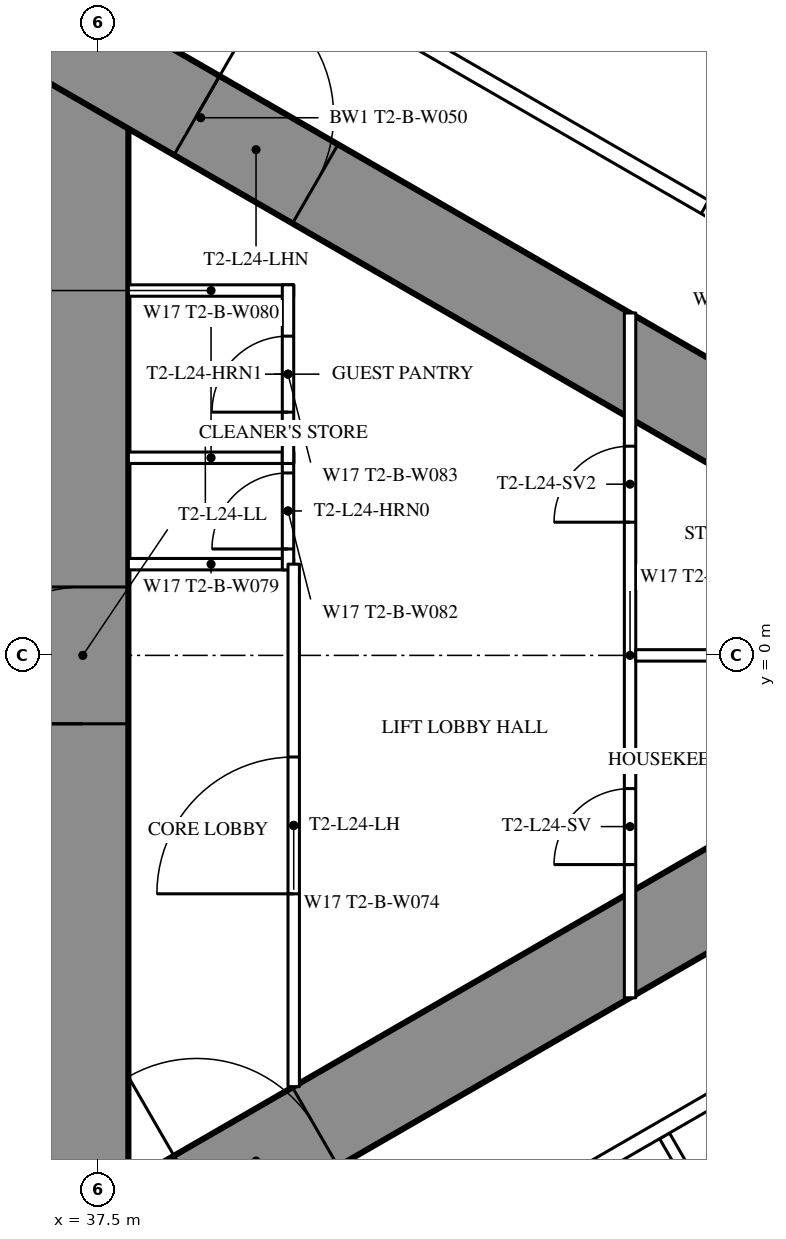
"""IFC4 building model, lengths in metres.
Left out: names, types, materials, properties, quantities, classifications, styles, units other than length and angle.
Written with IfcOpenShell. Run it as: python <this file> out.ifc"""

import sys

from ifc_helpers import new_model, si_unit, direction, frame, frame_2d, origin, place, context, subcontext, project, spatial, rectangle, extrude, element, fill, save


model = new_model("IFC4")
c1 = context("Model", 3, precision=1e-05, world=origin(), true_north=direction((0.0, 1.0)))
c2 = subcontext(c1, "Body", "Model", "MODEL_VIEW")
j1 = project(units=[si_unit("LENGTHUNIT", "METRE"), si_unit("PLANEANGLEUNIT", "RADIAN")], contexts=[c1])
p1 = place(None, origin())
s1 = spatial("IfcSite", under=j1, at=p1, CompositionType="ELEMENT")
p2 = place(p1, origin())
s2 = spatial("IfcBuilding", under=s1, at=p2, CompositionType="ELEMENT")
p3 = place(p2, frame((0.0, 0.0, 94.1)))
s3 = spatial("IfcBuildingStorey", under=s2, at=p3, CompositionType="ELEMENT", Elevation=94.1)
p4 = place(p3, frame((37.3, -8.6, 0.0), z_axis=(0.0, 0.0, 1.0), x_axis=(0.0, 1.0, 0.0)))
e1 = element("IfcWall", 1, at=p4, inside=s3, PredefinedType="SHEAR", context=c2, shape_type="SweptSolid", body=[
    extrude(rectangle(XDim=17.2, YDim=1.2, at=frame_2d((8.6, 0.0))), origin(), (0.0, 0.0, 1.0), 3.5),
])
p5 = place(p4, frame((7.7, 0.0, 0.0)))
e2 = element("IfcOpeningElement", 2, at=p5, cuts=e1, PredefinedType="OPENING", context=c2, shape_type="SweptSolid", body=[
    extrude(rectangle(XDim=1.8, YDim=2.2, at=frame_2d((0.9, 1.1))), frame((0.0, 0.61, 0.0), z_axis=(0.0, -1.0, 0.0), x_axis=(1.0, 0.0, 0.0)), (0.0, 0.0, 1.0), 1.22),
])
p6 = place(p3, frame((27.2, -13.8, 0.0), z_axis=(0.0, 0.0, 1.0), x_axis=(0.866027159892, 0.499996958321, 0.0)))
e3 = element("IfcWall", 3, at=p6, inside=s3, PredefinedType="SHEAR", context=c2, shape_type="SweptSolid", body=[
    extrude(rectangle(XDim=27.947, YDim=1.2, at=frame_2d((13.973, 0.0))), origin(), (0.0, 0.0, 1.0), 3.5),
])
p7 = place(p6, frame((4.6, 0.0, 0.0)))
e4 = element("IfcOpeningElement", 4, at=p7, cuts=e3, PredefinedType="OPENING", context=c2, shape_type="SweptSolid", body=[
    extrude(rectangle(XDim=1.0, YDim=2.2, at=frame_2d((0.5, 1.1))), frame((0.0, 0.61, 0.0), z_axis=(0.0, -1.0, 0.0), x_axis=(1.0, 0.0, 0.0)), (0.0, 0.0, 1.0), 1.22),
])
p8 = place(p6, frame((13.395, 0.0, 0.0)))
e5 = element("IfcOpeningElement", 5, at=p8, cuts=e3, PredefinedType="OPENING", context=c2, shape_type="SweptSolid", body=[
    extrude(rectangle(XDim=1.8, YDim=2.2, at=frame_2d((0.9, 1.1))), frame((0.0, 0.61, 0.0), z_axis=(0.0, -1.0, 0.0), x_axis=(1.0, 0.0, 0.0)), (0.0, 0.0, 1.0), 1.22),
])
p9 = place(p3, frame((27.2, 13.8, 0.0), z_axis=(0.0, 0.0, 1.0), x_axis=(0.866024515034, -0.500001539357, 0.0)))
e6 = element("IfcWall", 6, at=p9, inside=s3, PredefinedType="SHEAR", context=c2, shape_type="SweptSolid", body=[
    extrude(rectangle(XDim=26.907, YDim=1.2, at=frame_2d((13.454, 0.0))), origin(), (0.0, 0.0, 1.0), 3.5),
])
p10 = place(p9, frame((4.6, 0.0, 0.0)))
e7 = element("IfcOpeningElement", 7, at=p10, cuts=e6, PredefinedType="OPENING", context=c2, shape_type="SweptSolid", body=[
    extrude(rectangle(XDim=1.0, YDim=2.2, at=frame_2d((0.5, 1.1))), frame((0.0, 0.61, 0.0), z_axis=(0.0, -1.0, 0.0), x_axis=(1.0, 0.0, 0.0)), (0.0, 0.0, 1.0), 1.22),
])
p11 = place(p9, frame((13.395, 0.0, 0.0)))
e8 = element("IfcOpeningElement", 8, at=p11, cuts=e6, PredefinedType="OPENING", context=c2, shape_type="SweptSolid", body=[
    extrude(rectangle(XDim=1.8, YDim=2.2, at=frame_2d((0.9, 1.1))), frame((0.0, 0.61, 0.0), z_axis=(0.0, -1.0, 0.0), x_axis=(1.0, 0.0, 0.0)), (0.0, 0.0, 1.0), 1.22),
])
p12 = place(p3, frame((44.954, -6.321, 0.0), z_axis=(0.0, 0.0, 1.0), x_axis=(0.500018676722, -0.866014620505, 0.0)))
e9 = element("IfcWall", 9, at=p12, inside=s3, PredefinedType="PARTITIONING", context=c2, shape_type="SweptSolid", body=[
    extrude(rectangle(XDim=8.704, YDim=0.15, at=frame_2d((4.352, 0.0))), origin(), (0.0, 0.0, 1.0), 2.2),
])
p13 = place(p3, frame((37.96, -10.243, 0.0), z_axis=(0.0, 0.0, 1.0), x_axis=(0.866026429433, 0.499998223521, 0.0)))
e10 = element("IfcWall", 10, at=p13, inside=s3, PredefinedType="PARTITIONING", context=c2, shape_type="SweptSolid", body=[
    extrude(rectangle(XDim=20.487, YDim=0.2, at=frame_2d((10.243, 0.0))), origin(), (0.0, 0.0, 1.0), 3.25),
])
p14 = place(p13, frame((4.047, 0.0, 0.0)))
e11 = element("IfcOpeningElement", 11, at=p14, cuts=e10, PredefinedType="OPENING", context=c2, shape_type="SweptSolid", body=[
    extrude(rectangle(XDim=0.95, YDim=2.2, at=frame_2d((0.475, 1.1))), frame((0.0, 0.11, 0.0), z_axis=(0.0, -1.0, 0.0), x_axis=(1.0, 0.0, 0.0)), (0.0, 0.0, 1.0), 0.22),
])
p15 = place(p13, frame((11.04, 0.0, 0.0)))
e12 = element("IfcOpeningElement", 12, at=p15, cuts=e10, PredefinedType="OPENING", context=c2, shape_type="SweptSolid", body=[
    extrude(rectangle(XDim=0.95, YDim=2.2, at=frame_2d((0.475, 1.1))), frame((0.0, 0.11, 0.0), z_axis=(0.0, -1.0, 0.0), x_axis=(1.0, 0.0, 0.0)), (0.0, 0.0, 1.0), 0.22),
])
p16 = place(p13, frame((13.035, 0.0, 0.0)))
e13 = element("IfcOpeningElement", 13, at=p16, cuts=e10, PredefinedType="OPENING", context=c2, shape_type="SweptSolid", body=[
    extrude(rectangle(XDim=0.95, YDim=2.2, at=frame_2d((0.475, 1.1))), frame((0.0, 0.11, 0.0), z_axis=(0.0, -1.0, 0.0), x_axis=(1.0, 0.0, 0.0)), (0.0, 0.0, 1.0), 0.22),
])
p17 = place(p13, frame((17.085, 0.0, 0.0)))
e14 = element("IfcOpeningElement", 14, at=p17, cuts=e10, PredefinedType="OPENING", context=c2, shape_type="SweptSolid", body=[
    extrude(rectangle(XDim=0.95, YDim=2.2, at=frame_2d((0.475, 1.1))), frame((0.0, 0.11, 0.0), z_axis=(0.0, -1.0, 0.0), x_axis=(1.0, 0.0, 0.0)), (0.0, 0.0, 1.0), 0.22),
])
p18 = place(p13, frame((1.048, 0.0, 0.0)))
e15 = element("IfcOpeningElement", 15, at=p18, cuts=e10, PredefinedType="OPENING", context=c2, shape_type="SweptSolid", body=[
    extrude(rectangle(XDim=1.8, YDim=2.2, at=frame_2d((0.9, 1.1))), frame((0.0, 0.11, 0.0), z_axis=(0.0, -1.0, 0.0), x_axis=(1.0, 0.0, 0.0)), (0.0, 0.0, 1.0), 0.22),
])
p19 = place(p3, frame((36.834, 10.894, 0.0), z_axis=(0.0, 0.0, 1.0), x_axis=(0.866028157229, -0.499995230863, 0.0)))
e16 = element("IfcWall", 16, at=p19, inside=s3, PredefinedType="PARTITIONING", context=c2, shape_type="SweptSolid", body=[
    extrude(rectangle(XDim=21.667, YDim=0.2, at=frame_2d((10.833, 0.0))), origin(), (0.0, 0.0, 1.0), 3.25),
])
p20 = place(p19, frame((14.04, 0.0, 0.0)))
e17 = element("IfcOpeningElement", 17, at=p20, cuts=e16, PredefinedType="OPENING", context=c2, shape_type="SweptSolid", body=[
    extrude(rectangle(XDim=0.95, YDim=2.2, at=frame_2d((0.475, 1.1))), frame((0.0, 0.11, 0.0), z_axis=(0.0, -1.0, 0.0), x_axis=(1.0, 0.0, 0.0)), (0.0, 0.0, 1.0), 0.22),
])
p21 = place(p19, frame((9.99, 0.0, 0.0)))
e18 = element("IfcOpeningElement", 18, at=p21, cuts=e16, PredefinedType="OPENING", context=c2, shape_type="SweptSolid", body=[
    extrude(rectangle(XDim=0.95, YDim=2.2, at=frame_2d((0.475, 1.1))), frame((0.0, 0.11, 0.0), z_axis=(0.0, -1.0, 0.0), x_axis=(1.0, 0.0, 0.0)), (0.0, 0.0, 1.0), 0.22),
])
p22 = place(p19, frame((3.35, 0.0, 0.0)))
e19 = element("IfcOpeningElement", 19, at=p22, cuts=e16, PredefinedType="OPENING", context=c2, shape_type="SweptSolid", body=[
    extrude(rectangle(XDim=1.0, YDim=2.2, at=frame_2d((0.5, 1.1))), frame((0.0, 0.11, 0.0), z_axis=(0.0, -1.0, 0.0), x_axis=(1.0, 0.0, 0.0)), (0.0, 0.0, 1.0), 0.22),
])
for number, where, z_axis, x_axis in (
    (20, (37.9, 1.2, 0.0), (0.0, 0.0, 1.0), (1.0, 0.0, 0.0)),
    (21, (37.9, 2.6, 0.0), (0.0, 0.0, 1.0), (1.0, 0.0, 0.0)),
    (22, (37.9, 4.8, 0.0), (0.0, 0.0, 1.0), (1.0, 0.0, 0.0)),
):
    element("IfcWall", number, at=place(p3, frame(where, z_axis=z_axis, x_axis=x_axis)), inside=s3, PredefinedType="PARTITIONING", context=c2, shape_type="SweptSolid", body=[
        extrude(rectangle(XDim=2.175, YDim=0.15, at=frame_2d((1.087, 0.0))), origin(), (0.0, 0.0, 1.0), 3.25),
    ])
p23 = place(p3, frame((40.0, 1.125, 0.0), z_axis=(0.0, 0.0, 1.0), x_axis=(0.0, 1.0, 0.0)))
e23 = element("IfcWall", 23, at=p23, inside=s3, PredefinedType="PARTITIONING", context=c2, shape_type="SweptSolid", body=[
    extrude(rectangle(XDim=1.55, YDim=0.15, at=frame_2d((0.775, 0.0))), origin(), (0.0, 0.0, 1.0), 3.25),
])
p24 = place(p23, frame((0.275, 0.0, 0.0)))
e24 = element("IfcOpeningElement", 24, at=p24, cuts=e23, PredefinedType="OPENING", context=c2, shape_type="SweptSolid", body=[
    extrude(rectangle(XDim=1.0, YDim=2.2, at=frame_2d((0.5, 1.1))), frame((0.0, 0.085, 0.0), z_axis=(0.0, -1.0, 0.0), x_axis=(1.0, 0.0, 0.0)), (0.0, 0.0, 1.0), 0.17),
])
p25 = place(p3, frame((40.0, 2.525, 0.0), z_axis=(0.0, 0.0, 1.0), x_axis=(0.0, 1.0, 0.0)))
e25 = element("IfcWall", 25, at=p25, inside=s3, PredefinedType="PARTITIONING", context=c2, shape_type="SweptSolid", body=[
    extrude(rectangle(XDim=2.35, YDim=0.15, at=frame_2d((1.175, 0.0))), origin(), (0.0, 0.0, 1.0), 3.25),
])
p26 = place(p25, frame((0.675, 0.0, 0.0)))
e26 = element("IfcOpeningElement", 26, at=p26, cuts=e25, PredefinedType="OPENING", context=c2, shape_type="SweptSolid", body=[
    extrude(rectangle(XDim=1.0, YDim=2.2, at=frame_2d((0.5, 1.1))), frame((0.0, 0.085, 0.0), z_axis=(0.0, -1.0, 0.0), x_axis=(1.0, 0.0, 0.0)), (0.0, 0.0, 1.0), 0.17),
])
p27 = place(p3, frame((40.075, -5.674, 0.0), z_axis=(0.0, 0.0, 1.0), x_axis=(0.0, 1.0, 0.0)))
e27 = element("IfcWall", 27, at=p27, inside=s3, PredefinedType="PARTITIONING", context=c2, shape_type="SweptSolid", body=[
    extrude(rectangle(XDim=6.874, YDim=0.15, at=frame_2d((3.437, 0.0))), origin(), (0.0, 0.0, 1.0), 3.25),
])
p28 = place(p27, frame((2.537, 0.0, 0.0)))
e28 = element("IfcOpeningElement", 28, at=p28, cuts=e27, PredefinedType="OPENING", context=c2, shape_type="SweptSolid", body=[
    extrude(rectangle(XDim=1.8, YDim=2.2, at=frame_2d((0.9, 1.1))), frame((0.0, 0.085, 0.0), z_axis=(0.0, -1.0, 0.0), x_axis=(1.0, 0.0, 0.0)), (0.0, 0.0, 1.0), 0.17),
])
p29 = place(p3, frame((44.5, -4.505, 0.0), z_axis=(0.0, 0.0, 1.0), x_axis=(0.0, 1.0, 0.0)))
e29 = element("IfcWall", 29, at=p29, inside=s3, PredefinedType="PARTITIONING", context=c2, shape_type="SweptSolid", body=[
    extrude(rectangle(XDim=9.009, YDim=0.15, at=frame_2d((4.505, 0.0))), origin(), (0.0, 0.0, 1.0), 2.45),
])
p30 = place(p29, frame((1.752, 0.0, 0.0)))
e30 = element("IfcOpeningElement", 30, at=p30, cuts=e29, PredefinedType="OPENING", context=c2, shape_type="SweptSolid", body=[
    extrude(rectangle(XDim=1.0, YDim=2.2, at=frame_2d((0.5, 1.1))), frame((0.0, 0.085, 0.0), z_axis=(0.0, -1.0, 0.0), x_axis=(1.0, 0.0, 0.0)), (0.0, 0.0, 1.0), 0.17),
])
p31 = place(p29, frame((6.257, 0.0, 0.0)))
e31 = element("IfcOpeningElement", 31, at=p31, cuts=e29, PredefinedType="OPENING", context=c2, shape_type="SweptSolid", body=[
    extrude(rectangle(XDim=1.0, YDim=2.2, at=frame_2d((0.5, 1.1))), frame((0.0, 0.085, 0.0), z_axis=(0.0, -1.0, 0.0), x_axis=(1.0, 0.0, 0.0)), (0.0, 0.0, 1.0), 0.17),
])
p32 = place(p3, frame((44.575, 0.0, 0.0), z_axis=(0.0, 0.0, 1.0), x_axis=(1.0, 0.0, 0.0)))
e32 = element("IfcWall", 32, at=p32, inside=s3, PredefinedType="PARTITIONING", context=c2, shape_type="SweptSolid", body=[
    extrude(rectangle(XDim=7.727, YDim=0.15, at=frame_2d((3.864, 0.0))), origin(), (0.0, 0.0, 1.0), 2.2),
])
p33 = place(p21, origin())
e33 = element("IfcDoor", 33, at=p33, inside=s3, OperationType="SINGLE_SWING_LEFT", PredefinedType="DOOR", context=c2, shape_type="SweptSolid", body=[
    extrude(rectangle(XDim=0.95, YDim=2.2, at=frame_2d((0.475, 1.1))), frame((0.0, 0.025, 0.0), z_axis=(0.0, -1.0, 0.0), x_axis=(1.0, 0.0, 0.0)), (0.0, 0.0, 1.0), 0.05),
])
fill(e18, e33)
p34 = place(p24, origin())
e34 = element("IfcDoor", 34, at=p34, inside=s3, OperationType="SINGLE_SWING_LEFT", PredefinedType="DOOR", context=c2, shape_type="SweptSolid", body=[
    extrude(rectangle(XDim=1.0, YDim=2.2, at=frame_2d((0.5, 1.1))), frame((0.0, 0.025, 0.0), z_axis=(0.0, -1.0, 0.0), x_axis=(1.0, 0.0, 0.0)), (0.0, 0.0, 1.0), 0.05),
])
fill(e24, e34)
p35 = place(p26, origin())
e35 = element("IfcDoor", 35, at=p35, inside=s3, OperationType="SINGLE_SWING_LEFT", PredefinedType="DOOR", context=c2, shape_type="SweptSolid", body=[
    extrude(rectangle(XDim=1.0, YDim=2.2, at=frame_2d((0.5, 1.1))), frame((0.0, 0.025, 0.0), z_axis=(0.0, -1.0, 0.0), x_axis=(1.0, 0.0, 0.0)), (0.0, 0.0, 1.0), 0.05),
])
fill(e26, e35)
p36 = place(p28, origin())
e36 = element("IfcDoor", 36, at=p36, inside=s3, OperationType="DOUBLE_DOOR_SINGLE_SWING", PredefinedType="DOOR", context=c2, shape_type="SweptSolid", body=[
    extrude(rectangle(XDim=1.8, YDim=2.2, at=frame_2d((0.9, 1.1))), frame((0.0, 0.025, 0.0), z_axis=(0.0, -1.0, 0.0), x_axis=(1.0, 0.0, 0.0)), (0.0, 0.0, 1.0), 0.05),
])
fill(e28, e36)
p37 = place(p30, origin())
e37 = element("IfcDoor", 37, at=p37, inside=s3, OperationType="SINGLE_SWING_LEFT", PredefinedType="DOOR", context=c2, shape_type="SweptSolid", body=[
    extrude(rectangle(XDim=1.0, YDim=2.2, at=frame_2d((0.5, 1.1))), frame((0.0, 0.025, 0.0), z_axis=(0.0, -1.0, 0.0), x_axis=(1.0, 0.0, 0.0)), (0.0, 0.0, 1.0), 0.05),
])
fill(e30, e37)
p38 = place(p31, origin())
e38 = element("IfcDoor", 38, at=p38, inside=s3, OperationType="SINGLE_SWING_LEFT", PredefinedType="DOOR", context=c2, shape_type="SweptSolid", body=[
    extrude(rectangle(XDim=1.0, YDim=2.2, at=frame_2d((0.5, 1.1))), frame((0.0, 0.025, 0.0), z_axis=(0.0, -1.0, 0.0), x_axis=(1.0, 0.0, 0.0)), (0.0, 0.0, 1.0), 0.05),
])
fill(e31, e38)
p39 = place(p8, origin())
e39 = element("IfcDoor", 39, at=p39, inside=s3, OperationType="DOUBLE_DOOR_SINGLE_SWING", PredefinedType="DOOR", context=c2, shape_type="SweptSolid", body=[
    extrude(rectangle(XDim=1.8, YDim=2.2, at=frame_2d((0.9, 1.1))), frame((0.0, 0.025, 0.0), z_axis=(0.0, -1.0, 0.0), x_axis=(1.0, 0.0, 0.0)), (0.0, 0.0, 1.0), 0.05),
])
fill(e5, e39)
p40 = place(p11, origin())
e40 = element("IfcDoor", 40, at=p40, inside=s3, OperationType="DOUBLE_DOOR_SINGLE_SWING", PredefinedType="DOOR", context=c2, shape_type="SweptSolid", body=[
    extrude(rectangle(XDim=1.8, YDim=2.2, at=frame_2d((0.9, 1.1))), frame((0.0, 0.025, 0.0), z_axis=(0.0, -1.0, 0.0), x_axis=(1.0, 0.0, 0.0)), (0.0, 0.0, 1.0), 0.05),
])
fill(e8, e40)
p41 = place(p5, origin())
e41 = element("IfcDoor", 41, at=p41, inside=s3, OperationType="DOUBLE_DOOR_SINGLE_SWING", PredefinedType="DOOR", context=c2, shape_type="SweptSolid", body=[
    extrude(rectangle(XDim=1.8, YDim=2.2, at=frame_2d((0.9, 1.1))), frame((0.0, 0.025, 0.0), z_axis=(0.0, -1.0, 0.0), x_axis=(1.0, 0.0, 0.0)), (0.0, 0.0, 1.0), 0.05),
])
fill(e2, e41)
save(model, sys.argv[1])
